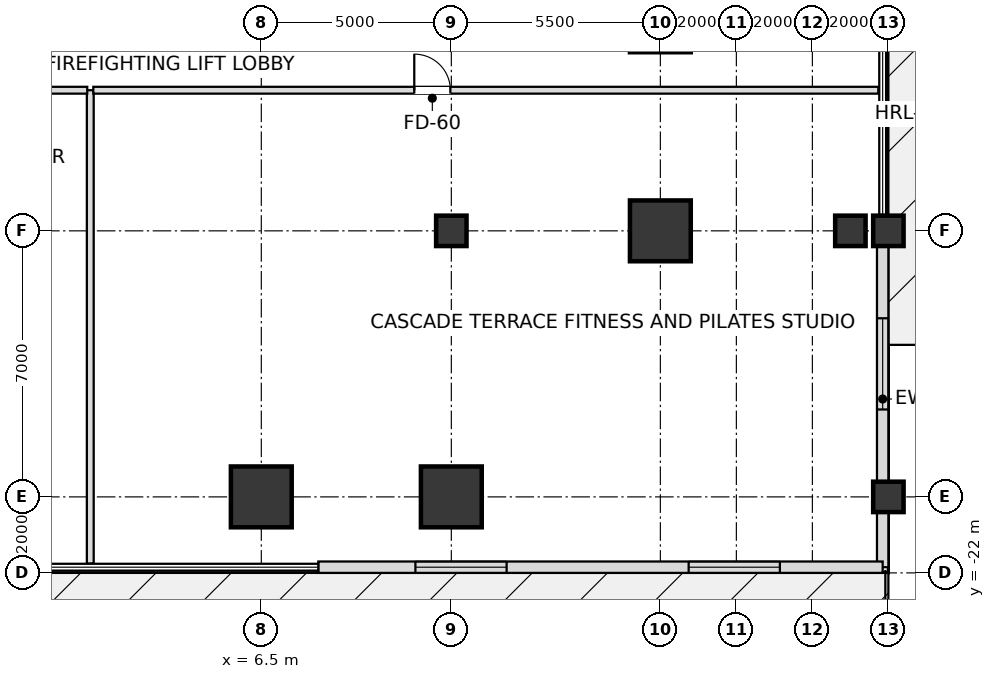
"""IFC4 building model, lengths in metres.
Left out: names, types, materials, properties, quantities, classifications, styles, units other than length and angle.
Written with IfcOpenShell. Run it as: python <this file> out.ifc"""

import sys

from ifc_helpers import new_model, si_unit, direction, frame, frame_2d, origin, origin_2d, place, context, subcontext, project, spatial, rectangle, extrude, element, fill, save


model = new_model("IFC4")
c1 = context("Model", 3, precision=1e-05, world=origin(), true_north=direction((0.0, 1.0)))
c2 = subcontext(c1, "Body", "Model", "MODEL_VIEW")
j1 = project(units=[si_unit("LENGTHUNIT", "METRE"), si_unit("PLANEANGLEUNIT", "RADIAN")], contexts=[c1])
p1 = place(None, origin())
s1 = spatial("IfcSite", under=j1, at=p1, CompositionType="ELEMENT")
p2 = place(p1, origin())
s2 = spatial("IfcBuilding", under=s1, at=p2, CompositionType="ELEMENT")
p3 = place(p2, frame((0.0, 0.0, 11.4)))
s3 = spatial("IfcBuildingStorey", under=s2, at=p3, CompositionType="ELEMENT", Elevation=11.4)
for number, where, z_axis, x_axis in (
    (1, (6.5, -20.0, 0.0), (0.0, 0.0, 1.0), (1.0, 0.0, 0.0)),
    (2, (11.5, -20.0, 0.0), (0.0, 0.0, 1.0), (1.0, 0.0, 0.0)),
    (3, (17.0, -13.0, 0.0), (0.0, 0.0, 1.0), (1.0, 0.0, 0.0)),
):
    element("IfcColumn", number, at=place(p3, frame(where, z_axis=z_axis, x_axis=x_axis)), inside=s3, PredefinedType="USERDEFINED", context=c2, shape_type="SweptSolid", body=[
        extrude(rectangle(XDim=1.6, YDim=1.6, at=origin_2d()), origin(), (0.0, 0.0, 1.0), 5.4),
    ])
for number, where, z_axis, x_axis in (
    (4, (23.0, -20.0, 0.0), (0.0, 0.0, 1.0), (1.0, 0.0, 0.0)),
    (5, (23.0, -13.0, 0.0), (0.0, 0.0, 1.0), (1.0, 0.0, 0.0)),
    (6, (11.5, -13.0, 0.0), (0.0, 0.0, 1.0), (1.0, 0.0, 0.0)),
    (7, (22.0, -13.0, 0.0), (0.0, 0.0, 1.0), (1.0, 0.0, 0.0)),
):
    element("IfcColumn", number, at=place(p3, frame(where, z_axis=z_axis, x_axis=x_axis)), inside=s3, PredefinedType="COLUMN", context=c2, shape_type="SweptSolid", body=[
        extrude(rectangle(XDim=0.8, YDim=0.8, at=origin_2d()), origin(), (0.0, 0.0, 1.0), 5.4),
    ])
p4 = place(p3, frame((22.85, -13.0, 0.0), z_axis=(0.0, 0.0, 1.0), x_axis=(0.0, -1.0, 0.0)))
e8 = element("IfcWall", 8, at=p4, inside=s3, PredefinedType="SOLIDWALL", context=c2, shape_type="SweptSolid", body=[
    extrude(rectangle(XDim=8.85, YDim=0.3, at=frame_2d((4.425, 0.0))), origin(), (0.0, 0.0, 1.0), 4.476),
])
p5 = place(p4, frame((2.3, 0.0, 0.8)))
e9 = element("IfcOpeningElement", 9, at=p5, cuts=e8, PredefinedType="OPENING", context=c2, shape_type="SweptSolid", body=[
    extrude(rectangle(XDim=2.4, YDim=2.2, at=frame_2d((1.2, 1.1))), frame((0.0, 0.16, 0.0), z_axis=(0.0, -1.0, 0.0), x_axis=(1.0, 0.0, 0.0)), (0.0, 0.0, 1.0), 0.32),
])
p6 = place(p3, frame((22.85, -21.85, 0.0), z_axis=(0.0, 0.0, 1.0), x_axis=(-1.0, 0.0, 0.0)))
e10 = element("IfcWall", 10, at=p6, inside=s3, PredefinedType="SOLIDWALL", context=c2, shape_type="SweptSolid", body=[
    extrude(rectangle(XDim=14.85, YDim=0.3, at=frame_2d((7.425, 0.0))), origin(), (0.0, 0.0, 1.0), 5.12),
])
p7 = place(p6, frame((2.705, 0.0, 0.8)))
e11 = element("IfcOpeningElement", 11, at=p7, cuts=e10, PredefinedType="OPENING", context=c2, shape_type="SweptSolid", body=[
    extrude(rectangle(XDim=2.4, YDim=2.2, at=frame_2d((1.2, 1.1))), frame((0.0, 0.16, 0.0), z_axis=(0.0, -1.0, 0.0), x_axis=(1.0, 0.0, 0.0)), (0.0, 0.0, 1.0), 0.32),
])
p8 = place(p6, frame((9.895, 0.0, 0.8)))
e12 = element("IfcOpeningElement", 12, at=p8, cuts=e10, PredefinedType="OPENING", context=c2, shape_type="SweptSolid", body=[
    extrude(rectangle(XDim=2.4, YDim=2.2, at=frame_2d((1.2, 1.1))), frame((0.0, 0.16, 0.0), z_axis=(0.0, -1.0, 0.0), x_axis=(1.0, 0.0, 0.0)), (0.0, 0.0, 1.0), 0.32),
])
p9 = place(p3, frame((2.0, -21.755, 0.0), z_axis=(0.0, 0.0, 1.0), x_axis=(0.0, 1.0, 0.0)))
e13 = element("IfcWall", 13, at=p9, inside=s3, PredefinedType="PARTITIONING", context=c2, shape_type="SweptSolid", body=[
    extrude(rectangle(XDim=12.455, YDim=0.18, at=frame_2d((6.228, 0.0))), origin(), (0.0, 0.0, 1.0), 4.476),
])
p10 = place(p3, frame((-22.695, -9.3, 0.0), z_axis=(0.0, 0.0, 1.0), x_axis=(1.0, 0.0, 0.0)))
e14 = element("IfcWall", 14, at=p10, inside=s3, PredefinedType="PARTITIONING", context=c2, shape_type="SweptSolid", body=[
    extrude(rectangle(XDim=24.615, YDim=0.18, at=frame_2d((12.308, 0.0))), origin(), (0.0, 0.0, 1.0), 4.41),
])
p11 = place(p10, frame((13.22, 0.0, 0.0)))
e15 = element("IfcOpeningElement", 15, at=p11, cuts=e14, PredefinedType="OPENING", context=c2, shape_type="SweptSolid", body=[
    extrude(rectangle(XDim=0.95, YDim=2.15, at=frame_2d((0.475, 1.075))), frame((0.0, 0.1, 0.0), z_axis=(0.0, -1.0, 0.0), x_axis=(1.0, 0.0, 0.0)), (0.0, 0.0, 1.0), 0.2),
])
p12 = place(p3, frame((2.08, -9.3, 0.0), z_axis=(0.0, 0.0, 1.0), x_axis=(1.0, 0.0, 0.0)))
e16 = element("IfcWall", 16, at=p12, inside=s3, PredefinedType="PARTITIONING", context=c2, shape_type="SweptSolid", body=[
    extrude(rectangle(XDim=20.655, YDim=0.18, at=frame_2d((10.328, 0.0))), origin(), (0.0, 0.0, 1.0), 4.41),
])
p13 = place(p12, frame((8.445, 0.0, 0.0)))
e17 = element("IfcOpeningElement", 17, at=p13, cuts=e16, PredefinedType="OPENING", context=c2, shape_type="SweptSolid", body=[
    extrude(rectangle(XDim=0.95, YDim=2.15, at=frame_2d((0.475, 1.075))), frame((0.0, 0.1, 0.0), z_axis=(0.0, -1.0, 0.0), x_axis=(1.0, 0.0, 0.0)), (0.0, 0.0, 1.0), 0.2),
])
p14 = place(p5, origin())
e18 = element("IfcWindow", 18, at=p14, inside=s3, PartitioningType="SINGLE_PANEL", PredefinedType="WINDOW", context=c2, shape_type="SweptSolid", body=[
    extrude(rectangle(XDim=2.4, YDim=2.2, at=frame_2d((1.2, 1.1))), frame((0.0, 0.03, 0.0), z_axis=(0.0, -1.0, 0.0), x_axis=(1.0, 0.0, 0.0)), (0.0, 0.0, 1.0), 0.06),
])
fill(e9, e18)
p15 = place(p7, origin())
e19 = element("IfcWindow", 19, at=p15, inside=s3, PartitioningType="SINGLE_PANEL", PredefinedType="WINDOW", context=c2, shape_type="SweptSolid", body=[
    extrude(rectangle(XDim=2.4, YDim=2.2, at=frame_2d((1.2, 1.1))), frame((0.0, 0.03, 0.0), z_axis=(0.0, -1.0, 0.0), x_axis=(1.0, 0.0, 0.0)), (0.0, 0.0, 1.0), 0.06),
])
fill(e11, e19)
p16 = place(p8, origin())
e20 = element("IfcWindow", 20, at=p16, inside=s3, PartitioningType="SINGLE_PANEL", PredefinedType="WINDOW", context=c2, shape_type="SweptSolid", body=[
    extrude(rectangle(XDim=2.4, YDim=2.2, at=frame_2d((1.2, 1.1))), frame((0.0, 0.03, 0.0), z_axis=(0.0, -1.0, 0.0), x_axis=(1.0, 0.0, 0.0)), (0.0, 0.0, 1.0), 0.06),
])
fill(e12, e20)
p17 = place(p13, origin())
e21 = element("IfcDoor", 21, at=p17, inside=s3, OperationType="SINGLE_SWING_LEFT", PredefinedType="DOOR", context=c2, shape_type="SweptSolid", body=[
    extrude(rectangle(XDim=0.95, YDim=2.15, at=frame_2d((0.475, 1.075))), frame((0.0, 0.025, 0.0), z_axis=(0.0, -1.0, 0.0), x_axis=(1.0, 0.0, 0.0)), (0.0, 0.0, 1.0), 0.05),
])
fill(e17, e21)
save(model, sys.argv[1])
